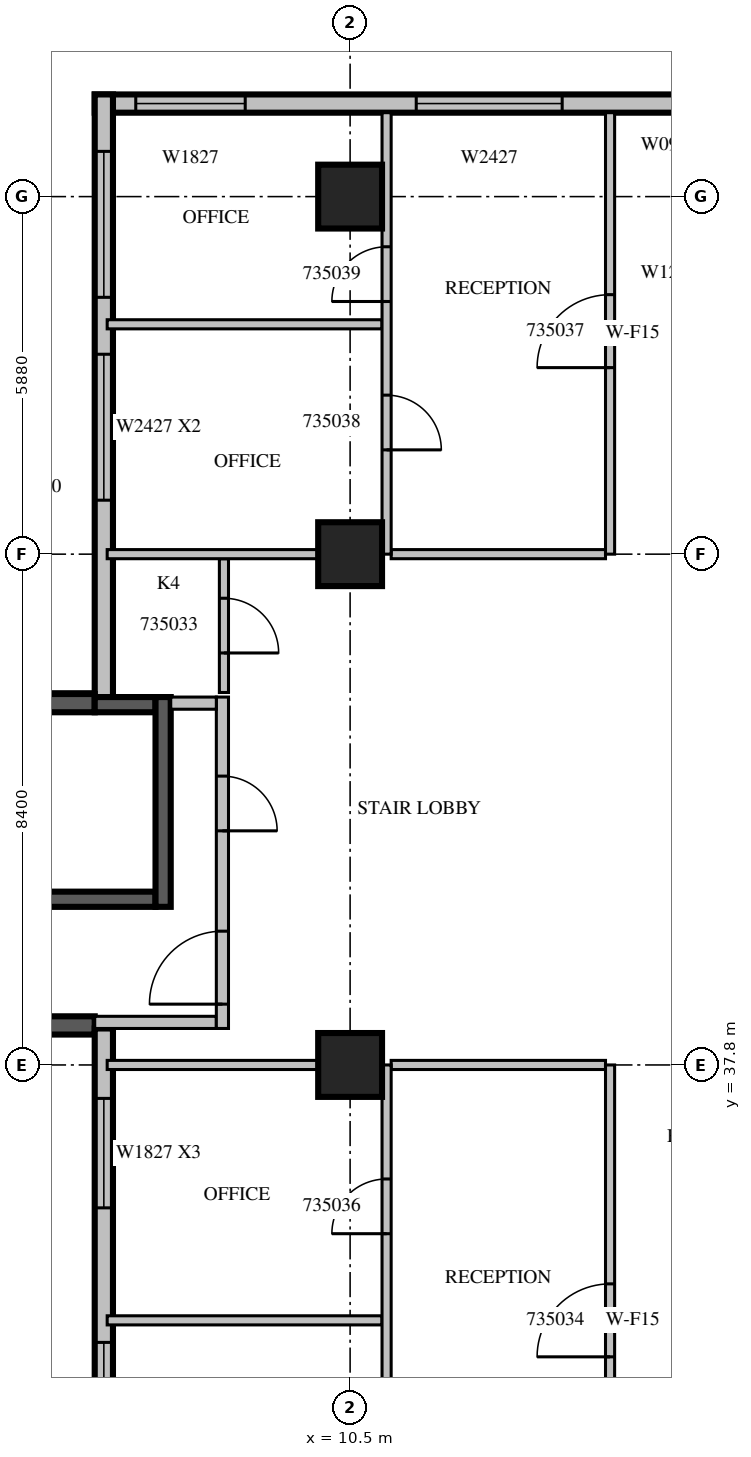
"""IFC4 building model, lengths in metres.
Left out: names, types, materials, properties, quantities, classifications, styles, units other than length and angle.
Written with IfcOpenShell. Run it as: python <this file> out.ifc"""

import sys

from ifc_helpers import new_model, si_unit, direction, frame, frame_2d, origin, origin_2d, place, context, subcontext, project, spatial, rectangle, extrude, source, transform, mapped, element, fill, save


model = new_model("IFC4")
c1 = context("Model", 3, precision=1e-05, world=origin(), true_north=direction((0.0, 1.0)))
c2 = subcontext(c1, "Body", "Model", "MODEL_VIEW")
j1 = project(units=[si_unit("LENGTHUNIT", "METRE"), si_unit("PLANEANGLEUNIT", "RADIAN")], contexts=[c1])
p1 = place(None, origin())
s1 = spatial("IfcSite", under=j1, at=p1, CompositionType="ELEMENT")
p2 = place(p1, origin())
s2 = spatial("IfcBuilding", under=s1, at=p2, CompositionType="ELEMENT")
p3 = place(p2, frame((0.0, 0.0, 158.1)))
s3 = spatial("IfcBuildingStorey", under=s2, at=p3, CompositionType="ELEMENT", Elevation=158.1)
m1 = source(origin(), c2, "Body", "SweptSolid", [
    extrude(rectangle(XDim=1.05, YDim=1.05, at=origin_2d()), origin(), (0.0, 0.0, 1.0), 4.2),
])
for number, where, z_axis, x_axis in (
    (1, (10.5, 37.8, 0.0), (0.0, 0.0, 1.0), (1.0, 0.0, 0.0)),
    (2, (10.5, 46.2, 0.0), (0.0, 0.0, 1.0), (1.0, 0.0, 0.0)),
    (3, (10.5, 52.08, 0.0), (0.0, 0.0, 1.0), (1.0, 0.0, 0.0)),
):
    element("IfcColumn", number, at=place(p3, frame(where, z_axis=z_axis, x_axis=x_axis)), inside=s3, PredefinedType="COLUMN", context=c2, shape_type="MappedRepresentation", body=[
        mapped(m1, transform((0.0, 0.0, 0.0), scale=1.0)),
    ])
m2 = source(origin(), c2, "Body", "SweptSolid", [
    extrude(rectangle(XDim=10.5, YDim=0.3, at=frame_2d((5.25, 0.0))), origin(), (0.0, 0.0, 1.0), 3.8),
])
p4 = place(p3, frame((16.8, 53.61, 0.0), z_axis=(0.0, 0.0, 1.0), x_axis=(-1.0, 0.0, 0.0)))
e4 = element("IfcWall", 4, at=p4, inside=s3, PredefinedType="STANDARD", context=c2, shape_type="MappedRepresentation", body=[
    mapped(m2, transform((0.0, 0.0, 0.0), scale=1.0)),
])
m3 = source(origin(), c2, "Body", "SweptSolid", [
    extrude(rectangle(XDim=1.8, YDim=2.7, at=frame_2d((0.9, 1.35))), frame((0.0, 0.16, 0.0), z_axis=(0.0, -1.0, 0.0), x_axis=(1.0, 0.0, 0.0)), (0.0, 0.0, 1.0), 0.32),
])
p5 = place(p4, frame((8.025, 0.0, 0.6)))
e5 = element("IfcOpeningElement", 5, at=p5, cuts=e4, PredefinedType="OPENING", context=c2, shape_type="MappedRepresentation", body=[
    mapped(m3, transform((0.0, 0.0, 0.0), scale=1.0)),
])
m4 = source(origin(), c2, "Body", "SweptSolid", [
    extrude(rectangle(XDim=2.4, YDim=2.7, at=frame_2d((1.2, 1.35))), frame((0.0, 0.16, 0.0), z_axis=(0.0, -1.0, 0.0), x_axis=(1.0, 0.0, 0.0)), (0.0, 0.0, 1.0), 0.32),
])
p6 = place(p4, frame((2.812, 0.0, 0.6)))
e6 = element("IfcOpeningElement", 6, at=p6, cuts=e4, PredefinedType="OPENING", context=c2, shape_type="MappedRepresentation", body=[
    mapped(m4, transform((0.0, 0.0, 0.0), scale=1.0)),
])
m5 = source(origin(), c2, "Body", "SweptSolid", [
    extrude(rectangle(XDim=9.91, YDim=0.3, at=frame_2d((4.955, 0.0))), origin(), (0.0, 0.0, 1.0), 3.8),
])
p7 = place(p3, frame((6.45, 53.76, 0.0), z_axis=(0.0, 0.0, 1.0), x_axis=(0.0, -1.0, 0.0)))
e7 = element("IfcWall", 7, at=p7, inside=s3, PredefinedType="STANDARD", context=c2, shape_type="MappedRepresentation", body=[
    mapped(m5, transform((0.0, 0.0, 0.0), scale=1.0)),
])
p8 = place(p7, frame((4.272, 0.0, 0.6)))
e8 = element("IfcOpeningElement", 8, at=p8, cuts=e7, PredefinedType="OPENING", context=c2, shape_type="MappedRepresentation", body=[
    mapped(m4, transform((0.0, 0.0, 0.0), scale=1.0)),
])
p9 = place(p7, frame((0.936, 0.0, 0.6)))
e9 = element("IfcOpeningElement", 9, at=p9, cuts=e7, PredefinedType="OPENING", context=c2, shape_type="MappedRepresentation", body=[
    mapped(m4, transform((0.0, 0.0, 0.0), scale=1.0)),
])
m6 = source(origin(), c2, "Body", "SweptSolid", [
    extrude(rectangle(XDim=6.1, YDim=0.3, at=frame_2d((3.05, 0.0))), origin(), (0.0, 0.0, 1.0), 3.8),
])
for number, where, z_axis, x_axis in (
    (10, (6.3, 43.75, 0.0), (0.0, 0.0, 1.0), (-1.0, 0.0, 0.0)),
    (11, (0.2, 38.45, 0.0), (0.0, 0.0, 1.0), (1.0, 0.0, 0.0)),
):
    element("IfcWall", number, at=place(p3, frame(where, z_axis=z_axis, x_axis=x_axis)), inside=s3, PredefinedType="SOLIDWALL", context=c2, shape_type="MappedRepresentation", body=[
        mapped(m6, transform((0.0, 0.0, 0.0), scale=1.0)),
    ])
m7 = source(origin(), c2, "Body", "SweptSolid", [
    extrude(rectangle(XDim=16.4, YDim=0.3, at=frame_2d((8.2, 0.0))), origin(), (0.0, 0.0, 1.0), 3.8),
])
p10 = place(p3, frame((6.45, 38.4, 0.0), z_axis=(0.0, 0.0, 1.0), x_axis=(0.0, -1.0, 0.0)))
e12 = element("IfcWall", 12, at=p10, inside=s3, PredefinedType="STANDARD", context=c2, shape_type="MappedRepresentation", body=[
    mapped(m7, transform((0.0, 0.0, 0.0), scale=1.0)),
])
p11 = place(p10, frame((1.15, 0.0, 0.6)))
e13 = element("IfcOpeningElement", 13, at=p11, cuts=e12, PredefinedType="OPENING", context=c2, shape_type="MappedRepresentation", body=[
    mapped(m3, transform((0.0, 0.0, 0.0), scale=1.0)),
])
p12 = place(p10, frame((5.162, 0.0, 0.6)))
e14 = element("IfcOpeningElement", 14, at=p12, cuts=e12, PredefinedType="OPENING", context=c2, shape_type="MappedRepresentation", body=[
    mapped(m3, transform((0.0, 0.0, 0.0), scale=1.0)),
])
p13 = place(p10, frame((9.438, 0.0, 0.6)))
e15 = element("IfcOpeningElement", 15, at=p13, cuts=e12, PredefinedType="OPENING", context=c2, shape_type="MappedRepresentation", body=[
    mapped(m3, transform((0.0, 0.0, 0.0), scale=1.0)),
])
m8 = source(origin(), c2, "Body", "SweptSolid", [
    extrude(rectangle(XDim=1.2, YDim=2.7, at=frame_2d((0.6, 1.35))), frame((0.0, 0.16, 0.0), z_axis=(0.0, -1.0, 0.0), x_axis=(1.0, 0.0, 0.0)), (0.0, 0.0, 1.0), 0.32),
])
p14 = place(p10, frame((12.912, 0.0, 0.6)))
e16 = element("IfcOpeningElement", 16, at=p14, cuts=e12, PredefinedType="OPENING", context=c2, shape_type="MappedRepresentation", body=[
    mapped(m8, transform((0.0, 0.0, 0.0), scale=1.0)),
])
m9 = source(origin(), c2, "Body", "SweptSolid", [
    extrude(rectangle(XDim=7.0, YDim=0.25, at=frame_2d((3.5, 0.0))), origin(), (0.0, 0.0, 1.0), 3.8),
])
p15 = place(p3, frame((0.3, 40.525, 0.0), z_axis=(0.0, 0.0, 1.0), x_axis=(1.0, 0.0, 0.0)))
e17 = element("IfcWall", 17, at=p15, inside=s3, PredefinedType="SOLIDWALL", context=c2, shape_type="MappedRepresentation", body=[
    mapped(m9, transform((0.0, 0.0, 0.0), scale=1.0)),
])
m10 = source(origin(), c2, "Body", "SweptSolid", [
    extrude(rectangle(XDim=1.1, YDim=2.1, at=frame_2d((0.55, 1.05))), frame((0.0, 0.135, 0.0), z_axis=(0.0, -1.0, 0.0), x_axis=(1.0, 0.0, 0.0)), (0.0, 0.0, 1.0), 0.27),
])
p16 = place(p15, frame((0.55, 0.0, 0.0)))
e18 = element("IfcOpeningElement", 18, at=p16, cuts=e17, PredefinedType="OPENING", context=c2, shape_type="MappedRepresentation", body=[
    mapped(m10, transform((0.0, 0.0, 0.0), scale=1.0)),
])
m11 = source(origin(), c2, "Body", "SweptSolid", [
    extrude(rectangle(XDim=1.0, YDim=0.25, at=frame_2d((0.5, 0.0))), origin(), (0.0, 0.0, 1.0), 3.8),
])
p17 = place(p3, frame((6.3, 43.725, 0.0), z_axis=(0.0, 0.0, 1.0), x_axis=(1.0, 0.0, 0.0)))
e19 = element("IfcWall", 19, at=p17, inside=s3, PredefinedType="SOLIDWALL", context=c2, shape_type="MappedRepresentation", body=[
    mapped(m11, transform((0.0, 0.0, 0.0), scale=1.0)),
])
m12 = source(origin(), c2, "Body", "SweptSolid", [
    extrude(rectangle(XDim=3.45, YDim=0.25, at=frame_2d((1.725, 0.0))), origin(), (0.0, 0.0, 1.0), 3.8),
])
p18 = place(p3, frame((7.425, 40.4, 0.0), z_axis=(0.0, 0.0, 1.0), x_axis=(0.0, 1.0, 0.0)))
e20 = element("IfcWall", 20, at=p18, inside=s3, PredefinedType="SOLIDWALL", context=c2, shape_type="MappedRepresentation", body=[
    mapped(m12, transform((0.0, 0.0, 0.0), scale=1.0)),
])
m13 = source(origin(), c2, "Body", "SweptSolid", [
    extrude(rectangle(XDim=2.0, YDim=0.2, at=frame_2d((1.0, 0.0))), origin(), (0.0, 0.0, 1.0), 3.8),
])
p19 = place(p3, frame((6.3, 38.5, 0.0), z_axis=(0.0, 0.0, 1.0), x_axis=(1.0, 0.0, 0.0)))
e21 = element("IfcWall", 21, at=p19, inside=s3, PredefinedType="PARTITIONING", context=c2, shape_type="MappedRepresentation", body=[
    mapped(m13, transform((0.0, 0.0, 0.0), scale=1.0)),
])
m14 = source(origin(), c2, "Body", "SweptSolid", [
    extrude(rectangle(XDim=5.45, YDim=0.2, at=frame_2d((2.725, 0.0))), origin(), (0.0, 0.0, 1.0), 3.8),
])
p20 = place(p3, frame((8.4, 38.4, 0.0), z_axis=(0.0, 0.0, 1.0), x_axis=(0.0, 1.0, 0.0)))
e22 = element("IfcWall", 22, at=p20, inside=s3, PredefinedType="PARTITIONING", context=c2, shape_type="MappedRepresentation", body=[
    mapped(m14, transform((0.0, 0.0, 0.0), scale=1.0)),
])
m15 = source(origin(), c2, "Body", "SweptSolid", [
    extrude(rectangle(XDim=1.2, YDim=2.1, at=frame_2d((0.6, 1.05))), frame((0.0, 0.11, 0.0), z_axis=(0.0, -1.0, 0.0), x_axis=(1.0, 0.0, 0.0)), (0.0, 0.0, 1.0), 0.22),
])
p21 = place(p20, frame((0.4, 0.0, 0.0)))
e23 = element("IfcOpeningElement", 23, at=p21, cuts=e22, PredefinedType="OPENING", context=c2, shape_type="MappedRepresentation", body=[
    mapped(m15, transform((0.0, 0.0, 0.0), scale=1.0)),
])
m16 = source(origin(), c2, "Body", "SweptSolid", [
    extrude(rectangle(XDim=0.9, YDim=2.1, at=frame_2d((0.45, 1.05))), frame((0.0, 0.11, 0.0), z_axis=(0.0, -1.0, 0.0), x_axis=(1.0, 0.0, 0.0)), (0.0, 0.0, 1.0), 0.22),
])
p22 = place(p20, frame((3.25, 0.0, 0.0)))
e24 = element("IfcOpeningElement", 24, at=p22, cuts=e22, PredefinedType="OPENING", context=c2, shape_type="MappedRepresentation", body=[
    mapped(m16, transform((0.0, 0.0, 0.0), scale=1.0)),
])
m17 = source(origin(), c2, "Body", "SweptSolid", [
    extrude(rectangle(XDim=0.75, YDim=0.2, at=frame_2d((0.375, 0.0))), origin(), (0.0, 0.0, 1.0), 3.8),
])
p23 = place(p3, frame((7.55, 43.75, 0.0), z_axis=(0.0, 0.0, 1.0), x_axis=(1.0, 0.0, 0.0)))
e25 = element("IfcWall", 25, at=p23, inside=s3, PredefinedType="PARTITIONING", context=c2, shape_type="MappedRepresentation", body=[
    mapped(m17, transform((0.0, 0.0, 0.0), scale=1.0)),
])
m18 = source(origin(), c2, "Body", "SweptSolid", [
    extrude(rectangle(XDim=2.2, YDim=0.15, at=frame_2d((1.1, 0.0))), origin(), (0.0, 0.0, 1.0), 3.8),
])
p24 = place(p3, frame((8.425, 43.925, 0.0), z_axis=(0.0, 0.0, 1.0), x_axis=(0.0, 1.0, 0.0)))
e26 = element("IfcWall", 26, at=p24, inside=s3, PredefinedType="PARTITIONING", context=c2, shape_type="MappedRepresentation", body=[
    mapped(m18, transform((0.0, 0.0, 0.0), scale=1.0)),
])
m19 = source(origin(), c2, "Body", "SweptSolid", [
    extrude(rectangle(XDim=0.9, YDim=2.1, at=frame_2d((0.45, 1.05))), frame((0.0, 0.085, 0.0), z_axis=(0.0, -1.0, 0.0), x_axis=(1.0, 0.0, 0.0)), (0.0, 0.0, 1.0), 0.17),
])
p25 = place(p24, frame((0.65, 0.0, 0.0)))
e27 = element("IfcOpeningElement", 27, at=p25, cuts=e26, PredefinedType="OPENING", context=c2, shape_type="MappedRepresentation", body=[
    mapped(m19, transform((0.0, 0.0, 0.0), scale=1.0)),
])
m20 = source(origin(), c2, "Body", "SweptSolid", [
    extrude(rectangle(XDim=4.52, YDim=0.15, at=frame_2d((2.26, 0.0))), origin(), (0.0, 0.0, 1.0), 3.8),
])
p26 = place(p3, frame((11.025, 33.6, 0.0), z_axis=(0.0, 0.0, 1.0), x_axis=(-1.0, 0.0, 0.0)))
e28 = element("IfcWall", 28, at=p26, inside=s3, PredefinedType="PARTITIONING", context=c2, shape_type="MappedRepresentation", body=[
    mapped(m20, transform((0.0, 0.0, 0.0), scale=1.0)),
])
m21 = source(origin(), c2, "Body", "SweptSolid", [
    extrude(rectangle(XDim=3.471, YDim=0.15, at=frame_2d((1.736, 0.0))), origin(), (0.0, 0.0, 1.0), 3.8),
])
p27 = place(p3, frame((9.976, 37.8, 0.0), z_axis=(0.0, 0.0, 1.0), x_axis=(-1.0, 0.0, 0.0)))
e29 = element("IfcWall", 29, at=p27, inside=s3, PredefinedType="PARTITIONING", context=c2, shape_type="MappedRepresentation", body=[
    mapped(m21, transform((0.0, 0.0, 0.0), scale=1.0)),
])
m22 = source(origin(), c2, "Body", "SweptSolid", [
    extrude(rectangle(XDim=3.525, YDim=0.15, at=frame_2d((1.762, 0.0))), origin(), (0.0, 0.0, 1.0), 3.8),
])
p28 = place(p3, frame((14.7, 37.8, 0.0), z_axis=(0.0, 0.0, 1.0), x_axis=(-1.0, 0.0, 0.0)))
e30 = element("IfcWall", 30, at=p28, inside=s3, PredefinedType="PARTITIONING", context=c2, shape_type="MappedRepresentation", body=[
    mapped(m22, transform((0.0, 0.0, 0.0), scale=1.0)),
])
m23 = source(origin(), c2, "Body", "SweptSolid", [
    extrude(rectangle(XDim=8.4, YDim=0.15, at=frame_2d((4.2, 0.0))), origin(), (0.0, 0.0, 1.0), 3.8),
])
p29 = place(p3, frame((11.1, 29.4, 0.0), z_axis=(0.0, 0.0, 1.0), x_axis=(0.0, 1.0, 0.0)))
e31 = element("IfcWall", 31, at=p29, inside=s3, PredefinedType="PARTITIONING", context=c2, shape_type="MappedRepresentation", body=[
    mapped(m23, transform((0.0, 0.0, 0.0), scale=1.0)),
])
p30 = place(p29, frame((1.925, 0.0, 0.0)))
e32 = element("IfcOpeningElement", 32, at=p30, cuts=e31, PredefinedType="OPENING", context=c2, shape_type="MappedRepresentation", body=[
    mapped(m19, transform((0.0, 0.0, 0.0), scale=1.0)),
])
p31 = place(p29, frame((5.625, 0.0, 0.0)))
e33 = element("IfcOpeningElement", 33, at=p31, cuts=e31, PredefinedType="OPENING", context=c2, shape_type="MappedRepresentation", body=[
    mapped(m19, transform((0.0, 0.0, 0.0), scale=1.0)),
])
p32 = place(p3, frame((11.025, 49.98, 0.0), z_axis=(0.0, 0.0, 1.0), x_axis=(-1.0, 0.0, 0.0)))
e34 = element("IfcWall", 34, at=p32, inside=s3, PredefinedType="PARTITIONING", context=c2, shape_type="MappedRepresentation", body=[
    mapped(m20, transform((0.0, 0.0, 0.0), scale=1.0)),
])
p33 = place(p3, frame((9.976, 46.2, 0.0), z_axis=(0.0, 0.0, 1.0), x_axis=(-1.0, 0.0, 0.0)))
e35 = element("IfcWall", 35, at=p33, inside=s3, PredefinedType="PARTITIONING", context=c2, shape_type="MappedRepresentation", body=[
    mapped(m21, transform((0.0, 0.0, 0.0), scale=1.0)),
])
p34 = place(p3, frame((14.7, 46.2, 0.0), z_axis=(0.0, 0.0, 1.0), x_axis=(-1.0, 0.0, 0.0)))
e36 = element("IfcWall", 36, at=p34, inside=s3, PredefinedType="PARTITIONING", context=c2, shape_type="MappedRepresentation", body=[
    mapped(m22, transform((0.0, 0.0, 0.0), scale=1.0)),
])
m24 = source(origin(), c2, "Body", "SweptSolid", [
    extrude(rectangle(XDim=7.26, YDim=0.15, at=frame_2d((3.63, 0.0))), origin(), (0.0, 0.0, 1.0), 3.8),
])
p35 = place(p3, frame((11.1, 46.2, 0.0), z_axis=(0.0, 0.0, 1.0), x_axis=(0.0, 1.0, 0.0)))
e37 = element("IfcWall", 37, at=p35, inside=s3, PredefinedType="PARTITIONING", context=c2, shape_type="MappedRepresentation", body=[
    mapped(m24, transform((0.0, 0.0, 0.0), scale=1.0)),
])
p36 = place(p35, frame((1.715, 0.0, 0.0)))
e38 = element("IfcOpeningElement", 38, at=p36, cuts=e37, PredefinedType="OPENING", context=c2, shape_type="MappedRepresentation", body=[
    mapped(m19, transform((0.0, 0.0, 0.0), scale=1.0)),
])
p37 = place(p35, frame((4.155, 0.0, 0.0)))
e39 = element("IfcOpeningElement", 39, at=p37, cuts=e37, PredefinedType="OPENING", context=c2, shape_type="MappedRepresentation", body=[
    mapped(m19, transform((0.0, 0.0, 0.0), scale=1.0)),
])
p38 = place(p3, frame((14.775, 29.4, 0.0), z_axis=(0.0, 0.0, 1.0), x_axis=(0.0, 1.0, 0.0)))
e40 = element("IfcWall", 40, at=p38, inside=s3, PredefinedType="PARTITIONING", context=c2, shape_type="MappedRepresentation", body=[
    mapped(m23, transform((0.0, 0.0, 0.0), scale=1.0)),
])
m25 = source(origin(), c2, "Body", "SweptSolid", [
    extrude(rectangle(XDim=1.2, YDim=2.1, at=frame_2d((0.6, 1.05))), frame((0.0, 0.085, 0.0), z_axis=(0.0, -1.0, 0.0), x_axis=(1.0, 0.0, 0.0)), (0.0, 0.0, 1.0), 0.17),
])
p39 = place(p38, frame((3.6, 0.0, 0.0)))
e41 = element("IfcOpeningElement", 41, at=p39, cuts=e40, PredefinedType="OPENING", context=c2, shape_type="MappedRepresentation", body=[
    mapped(m25, transform((0.0, 0.0, 0.0), scale=1.0)),
])
p40 = place(p3, frame((14.775, 46.2, 0.0), z_axis=(0.0, 0.0, 1.0), x_axis=(0.0, 1.0, 0.0)))
e42 = element("IfcWall", 42, at=p40, inside=s3, PredefinedType="PARTITIONING", context=c2, shape_type="MappedRepresentation", body=[
    mapped(m24, transform((0.0, 0.0, 0.0), scale=1.0)),
])
p41 = place(p40, frame((3.067, 0.0, 0.0)))
e43 = element("IfcOpeningElement", 43, at=p41, cuts=e42, PredefinedType="OPENING", context=c2, shape_type="MappedRepresentation", body=[
    mapped(m25, transform((0.0, 0.0, 0.0), scale=1.0)),
])
m26 = source(origin(), c2, "Body", "SweptSolid", [
    extrude(rectangle(XDim=1.8, YDim=2.7, at=frame_2d((0.9, 1.35))), frame((0.0, 0.03, 0.0), z_axis=(0.0, -1.0, 0.0), x_axis=(1.0, 0.0, 0.0)), (0.0, 0.0, 1.0), 0.06),
])
p42 = place(p5, origin())
e44 = element("IfcWindow", 44, at=p42, inside=s3, PartitioningType="SINGLE_PANEL", PredefinedType="WINDOW", context=c2, shape_type="MappedRepresentation", body=[
    mapped(m26, transform((0.0, 0.0, 0.0), scale=1.0)),
])
fill(e5, e44)
m27 = source(origin(), c2, "Body", "SweptSolid", [
    extrude(rectangle(XDim=2.4, YDim=2.7, at=frame_2d((1.2, 1.35))), frame((0.0, 0.03, 0.0), z_axis=(0.0, -1.0, 0.0), x_axis=(1.0, 0.0, 0.0)), (0.0, 0.0, 1.0), 0.06),
])
p43 = place(p6, origin())
e45 = element("IfcWindow", 45, at=p43, inside=s3, PartitioningType="SINGLE_PANEL", PredefinedType="WINDOW", context=c2, shape_type="MappedRepresentation", body=[
    mapped(m27, transform((0.0, 0.0, 0.0), scale=1.0)),
])
fill(e6, e45)
p44 = place(p8, origin())
e46 = element("IfcWindow", 46, at=p44, inside=s3, PartitioningType="SINGLE_PANEL", PredefinedType="WINDOW", context=c2, shape_type="MappedRepresentation", body=[
    mapped(m27, transform((0.0, 0.0, 0.0), scale=1.0)),
])
fill(e8, e46)
p45 = place(p9, origin())
e47 = element("IfcWindow", 47, at=p45, inside=s3, PartitioningType="SINGLE_PANEL", PredefinedType="WINDOW", context=c2, shape_type="MappedRepresentation", body=[
    mapped(m27, transform((0.0, 0.0, 0.0), scale=1.0)),
])
fill(e9, e47)
p46 = place(p11, origin())
e48 = element("IfcWindow", 48, at=p46, inside=s3, PartitioningType="SINGLE_PANEL", PredefinedType="WINDOW", context=c2, shape_type="MappedRepresentation", body=[
    mapped(m26, transform((0.0, 0.0, 0.0), scale=1.0)),
])
fill(e13, e48)
p47 = place(p12, origin())
e49 = element("IfcWindow", 49, at=p47, inside=s3, PartitioningType="SINGLE_PANEL", PredefinedType="WINDOW", context=c2, shape_type="MappedRepresentation", body=[
    mapped(m26, transform((0.0, 0.0, 0.0), scale=1.0)),
])
fill(e14, e49)
m28 = source(origin(), c2, "Body", "SweptSolid", [
    extrude(rectangle(XDim=1.2, YDim=2.1, at=frame_2d((0.6, 1.05))), frame((0.0, 0.025, 0.0), z_axis=(0.0, -1.0, 0.0), x_axis=(1.0, 0.0, 0.0)), (0.0, 0.0, 1.0), 0.05),
])
p48 = place(p21, origin())
e50 = element("IfcDoor", 50, at=p48, inside=s3, OperationType="SINGLE_SWING_LEFT", PredefinedType="DOOR", context=c2, shape_type="MappedRepresentation", body=[
    mapped(m28, transform((0.0, 0.0, 0.0), scale=1.0)),
])
fill(e23, e50)
m29 = source(origin(), c2, "Body", "SweptSolid", [
    extrude(rectangle(XDim=0.9, YDim=2.1, at=frame_2d((0.45, 1.05))), frame((0.0, 0.025, 0.0), z_axis=(0.0, -1.0, 0.0), x_axis=(1.0, 0.0, 0.0)), (0.0, 0.0, 1.0), 0.05),
])
p49 = place(p22, origin())
e51 = element("IfcDoor", 51, at=p49, inside=s3, OperationType="SINGLE_SWING_RIGHT", PredefinedType="DOOR", context=c2, shape_type="MappedRepresentation", body=[
    mapped(m29, transform((0.0, 0.0, 0.0), scale=1.0)),
])
fill(e24, e51)
p50 = place(p25, origin())
e52 = element("IfcDoor", 52, at=p50, inside=s3, OperationType="SINGLE_SWING_RIGHT", PredefinedType="DOOR", context=c2, shape_type="MappedRepresentation", body=[
    mapped(m29, transform((0.0, 0.0, 0.0), scale=1.0)),
])
fill(e27, e52)
p51 = place(p39, origin())
e53 = element("IfcDoor", 53, at=p51, inside=s3, OperationType="SINGLE_SWING_LEFT", PredefinedType="DOOR", context=c2, shape_type="MappedRepresentation", body=[
    mapped(m28, transform((0.0, 0.0, 0.0), scale=1.0)),
])
fill(e41, e53)
p52 = place(p31, origin())
e54 = element("IfcDoor", 54, at=p52, inside=s3, OperationType="SINGLE_SWING_LEFT", PredefinedType="DOOR", context=c2, shape_type="MappedRepresentation", body=[
    mapped(m29, transform((0.0, 0.0, 0.0), scale=1.0)),
])
fill(e33, e54)
p53 = place(p41, origin())
e55 = element("IfcDoor", 55, at=p53, inside=s3, OperationType="SINGLE_SWING_LEFT", PredefinedType="DOOR", context=c2, shape_type="MappedRepresentation", body=[
    mapped(m28, transform((0.0, 0.0, 0.0), scale=1.0)),
])
fill(e43, e55)
p54 = place(p36, origin())
e56 = element("IfcDoor", 56, at=p54, inside=s3, OperationType="SINGLE_SWING_RIGHT", PredefinedType="DOOR", context=c2, shape_type="MappedRepresentation", body=[
    mapped(m29, transform((0.0, 0.0, 0.0), scale=1.0)),
])
fill(e38, e56)
p55 = place(p37, origin())
e57 = element("IfcDoor", 57, at=p55, inside=s3, OperationType="SINGLE_SWING_LEFT", PredefinedType="DOOR", context=c2, shape_type="MappedRepresentation", body=[
    mapped(m29, transform((0.0, 0.0, 0.0), scale=1.0)),
])
fill(e39, e57)
save(model, sys.argv[1])
